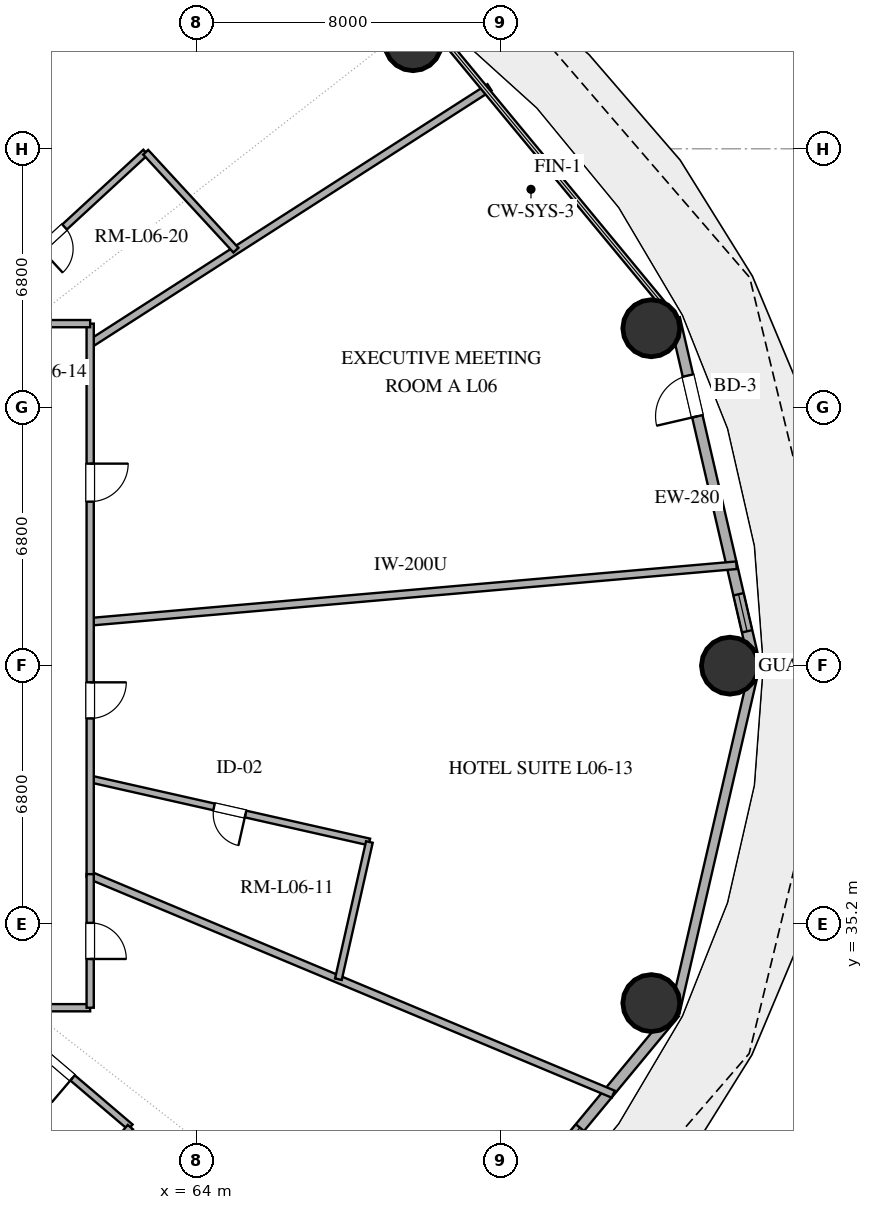
"""IFC4 building model, lengths in metres.
Left out: names, types, materials, properties, quantities, classifications, styles, units other than length and angle.
Written with IfcOpenShell. Run it as: python <this file> out.ifc"""

import sys

from ifc_helpers import new_model, si_unit, direction, frame, frame_2d, origin, origin_2d, place, context, subcontext, project, spatial, rectangle, hollow_circle, extrude, element, fill, save


model = new_model("IFC4")
c1 = context("Model", 3, precision=1e-05, world=origin(), true_north=direction((0.0, 1.0)))
c2 = subcontext(c1, "Body", "Model", "MODEL_VIEW")
j1 = project(units=[si_unit("LENGTHUNIT", "METRE"), si_unit("PLANEANGLEUNIT", "RADIAN")], contexts=[c1])
p1 = place(None, origin())
s1 = spatial("IfcSite", under=j1, at=p1, CompositionType="ELEMENT")
p2 = place(p1, origin())
s2 = spatial("IfcBuilding", under=s1, at=p2, CompositionType="ELEMENT")
p3 = place(p2, frame((0.0, 0.0, 31.8)))
s3 = spatial("IfcBuildingStorey", under=s2, at=p3, CompositionType="ELEMENT", Elevation=31.8)
for number, where, z_axis, x_axis in (
    (1, (78.035, 42.0, 0.0), (0.0, 0.0, 1.0), (1.0, 0.0, 0.0)),
    (2, (75.966, 50.878, 0.0), (0.0, 0.0, 1.0), (1.0, 0.0, 0.0)),
    (3, (69.697, 58.405, 0.0), (0.0, 0.0, 1.0), (1.0, 0.0, 0.0)),
    (4, (75.966, 33.122, 0.0), (0.0, 0.0, 1.0), (1.0, 0.0, 0.0)),
):
    element("IfcColumn", number, at=place(p3, frame(where, z_axis=z_axis, x_axis=x_axis)), inside=s3, PredefinedType="COLUMN", context=c2, shape_type="SweptSolid", body=[
        extrude(hollow_circle(Radius=0.75, WallThickness=0.04, at=origin_2d()), origin(), (0.0, 0.0, 1.0), 3.38),
    ])
p4 = place(p3, frame((78.696, 42.0, 0.0), z_axis=(0.0, 0.0, 1.0), x_axis=(-0.225454452941, 0.974253709076, 0.0)))
e5 = element("IfcWall", 5, at=p4, inside=s3, PredefinedType="SOLIDWALL", context=c2, shape_type="SweptSolid", body=[
    extrude(rectangle(XDim=9.38, YDim=0.28, at=frame_2d((4.69, 0.0))), origin(), (0.0, 0.0, 1.0), 3.38),
])
p5 = place(p4, frame((6.735, 0.0, 0.0)))
e6 = element("IfcOpeningElement", 6, at=p5, cuts=e5, PredefinedType="OPENING", context=c2, shape_type="SweptSolid", body=[
    extrude(rectangle(XDim=1.1, YDim=2.25, at=frame_2d((0.55, 1.125))), frame((0.0, 0.15, 0.0), z_axis=(0.0, -1.0, 0.0), x_axis=(1.0, 0.0, 0.0)), (0.0, 0.0, 1.0), 0.3),
])
p6 = place(p4, frame((0.929, 0.0, 0.85)))
e7 = element("IfcOpeningElement", 7, at=p6, cuts=e5, PredefinedType="OPENING", context=c2, shape_type="SweptSolid", body=[
    extrude(rectangle(XDim=1.0, YDim=1.8, at=frame_2d((0.5, 0.9))), frame((0.0, 0.15, 0.0), z_axis=(0.0, -1.0, 0.0), x_axis=(1.0, 0.0, 0.0)), (0.0, 0.0, 1.0), 0.3),
])
p7 = place(p3, frame((70.174, 25.114, 0.0), z_axis=(0.0, 0.0, 1.0), x_axis=(0.637296809613, 0.770618437657, 0.0)))
e8 = element("IfcWall", 8, at=p7, inside=s3, PredefinedType="SOLIDWALL", context=c2, shape_type="SweptSolid", body=[
    extrude(rectangle(XDim=10.053, YDim=0.28, at=frame_2d((5.027, 0.0))), origin(), (0.0, 0.0, 1.0), 3.38),
])
p8 = place(p7, frame((2.453, 0.0, 0.85)))
e9 = element("IfcOpeningElement", 9, at=p8, cuts=e8, PredefinedType="OPENING", context=c2, shape_type="SweptSolid", body=[
    extrude(rectangle(XDim=1.35, YDim=1.8, at=frame_2d((0.675, 0.9))), frame((0.0, 0.15, 0.0), z_axis=(0.0, -1.0, 0.0), x_axis=(1.0, 0.0, 0.0)), (0.0, 0.0, 1.0), 0.3),
])
p9 = place(p7, frame((4.789, 0.0, 0.85)))
e10 = element("IfcOpeningElement", 10, at=p9, cuts=e8, PredefinedType="OPENING", context=c2, shape_type="SweptSolid", body=[
    extrude(rectangle(XDim=1.35, YDim=1.8, at=frame_2d((0.675, 0.9))), frame((0.0, 0.15, 0.0), z_axis=(0.0, -1.0, 0.0), x_axis=(1.0, 0.0, 0.0)), (0.0, 0.0, 1.0), 0.3),
])
p10 = place(p3, frame((76.581, 32.862, 0.0), z_axis=(0.0, 0.0, 1.0), x_axis=(0.225454452941, 0.974253709076, 0.0)))
e11 = element("IfcWall", 11, at=p10, inside=s3, PredefinedType="SOLIDWALL", context=c2, shape_type="SweptSolid", body=[
    extrude(rectangle(XDim=9.38, YDim=0.25, at=frame_2d((4.69, 0.0))), origin(), (0.0, 0.0, 1.0), 3.38),
])
p11 = place(p3, frame((61.2, 43.155, 0.0), z_axis=(0.0, 0.0, 1.0), x_axis=(0.996194943742, 0.087152934912, 0.0)))
e12 = element("IfcWall", 12, at=p11, inside=s3, PredefinedType="PARTITIONING", context=c2, shape_type="SweptSolid", body=[
    extrude(rectangle(XDim=17.071, YDim=0.2, at=frame_2d((8.536, 0.0))), origin(), (0.0, 0.0, 1.0), 2.74),
])
p12 = place(p3, frame((53.116, 51.0, 0.0), z_axis=(0.0, 0.0, 1.0), x_axis=(0.494167535405, 0.869366693031, 0.0)))
e13 = element("IfcWall", 13, at=p12, inside=s3, PredefinedType="PARTITIONING", context=c2, shape_type="SweptSolid", body=[
    extrude(rectangle(XDim=14.934, YDim=0.2, at=frame_2d((7.467, 0.0))), origin(), (0.0, 0.0, 1.0), 2.74),
])
p13 = place(p3, frame((61.2, 50.472, 0.0), z_axis=(0.0, 0.0, 1.0), x_axis=(0.841576538847, 0.540137879863, 0.0)))
e14 = element("IfcWall", 14, at=p13, inside=s3, PredefinedType="PARTITIONING", context=c2, shape_type="SweptSolid", body=[
    extrude(rectangle(XDim=12.487, YDim=0.2, at=frame_2d((6.244, 0.0))), origin(), (0.0, 0.0, 1.0), 2.74),
])
p14 = place(p3, frame((61.2, 36.48, 0.0), z_axis=(0.0, 0.0, 1.0), x_axis=(0.922585702004, -0.385792201136, 0.0)))
e15 = element("IfcWall", 15, at=p14, inside=s3, PredefinedType="PARTITIONING", context=c2, shape_type="SweptSolid", body=[
    extrude(rectangle(XDim=14.918, YDim=0.2, at=frame_2d((7.459, 0.0))), origin(), (0.0, 0.0, 1.0), 2.74),
])
p15 = place(p3, frame((68.547, 37.361, 0.0), z_axis=(0.0, 0.0, 1.0), x_axis=(-0.975442349969, 0.220254902072, 0.0)))
e16 = element("IfcWall", 16, at=p15, inside=s3, PredefinedType="PLUMBINGWALL", context=c2, shape_type="SweptSolid", body=[
    extrude(rectangle(XDim=7.532, YDim=0.18, at=frame_2d((3.766, 0.0))), origin(), (0.0, 0.0, 1.0), 2.74),
])
p16 = place(p15, frame((3.341, 0.0, 0.0)))
e17 = element("IfcOpeningElement", 17, at=p16, cuts=e16, PredefinedType="OPENING", context=c2, shape_type="SweptSolid", body=[
    extrude(rectangle(XDim=0.85, YDim=2.1, at=frame_2d((0.425, 1.05))), frame((0.0, 0.1, 0.0), z_axis=(0.0, -1.0, 0.0), x_axis=(1.0, 0.0, 0.0)), (0.0, 0.0, 1.0), 0.2),
])
p17 = place(p3, frame((61.2, 51.0, 0.0), z_axis=(0.0, 0.0, 1.0), x_axis=(0.0, -1.0, 0.0)))
e18 = element("IfcWall", 18, at=p17, inside=s3, PredefinedType="PARTITIONING", context=c2, shape_type="SweptSolid", body=[
    extrude(rectangle(XDim=14.554, YDim=0.19, at=frame_2d((7.277, 0.0))), origin(), (0.0, 0.0, 1.0), 2.74),
])
p18 = place(p17, frame((3.684, 0.0, 0.0)))
e19 = element("IfcOpeningElement", 19, at=p18, cuts=e18, PredefinedType="OPENING", context=c2, shape_type="SweptSolid", body=[
    extrude(rectangle(XDim=1.0, YDim=2.2, at=frame_2d((0.5, 1.1))), frame((0.0, 0.105, 0.0), z_axis=(0.0, -1.0, 0.0), x_axis=(1.0, 0.0, 0.0)), (0.0, 0.0, 1.0), 0.21),
])
p19 = place(p17, frame((9.438, 0.0, 0.0)))
e20 = element("IfcOpeningElement", 20, at=p19, cuts=e18, PredefinedType="OPENING", context=c2, shape_type="SweptSolid", body=[
    extrude(rectangle(XDim=0.95, YDim=2.15, at=frame_2d((0.475, 1.075))), frame((0.0, 0.105, 0.0), z_axis=(0.0, -1.0, 0.0), x_axis=(1.0, 0.0, 0.0)), (0.0, 0.0, 1.0), 0.21),
])
p20 = place(p3, frame((55.449, 33.0, 0.0), z_axis=(0.0, 0.0, 1.0), x_axis=(0.637638501905, -0.770335732579, 0.0)))
e21 = element("IfcWall", 21, at=p20, inside=s3, PredefinedType="PARTITIONING", context=c2, shape_type="SweptSolid", body=[
    extrude(rectangle(XDim=14.187, YDim=0.2, at=frame_2d((7.094, 0.0))), origin(), (0.0, 0.0, 1.0), 2.74),
])
p21 = place(p3, frame((62.66, 55.51, 0.0), z_axis=(0.0, 0.0, 1.0), x_axis=(-0.735369975398, -0.67766584633, 0.0)))
e22 = element("IfcWall", 22, at=p21, inside=s3, PredefinedType="PLUMBINGWALL", context=c2, shape_type="SweptSolid", body=[
    extrude(rectangle(XDim=6.655, YDim=0.18, at=frame_2d((3.328, 0.0))), origin(), (0.0, 0.0, 1.0), 2.74),
])
p22 = place(p21, frame((2.903, 0.0, 0.0)))
e23 = element("IfcOpeningElement", 23, at=p22, cuts=e22, PredefinedType="OPENING", context=c2, shape_type="SweptSolid", body=[
    extrude(rectangle(XDim=0.85, YDim=2.1, at=frame_2d((0.425, 1.05))), frame((0.0, 0.1, 0.0), z_axis=(0.0, -1.0, 0.0), x_axis=(1.0, 0.0, 0.0)), (0.0, 0.0, 1.0), 0.2),
])
p23 = place(p3, frame((62.258, 29.859, 0.0), z_axis=(0.0, 0.0, 1.0), x_axis=(-0.761358380859, 0.648331254758, 0.0)))
e24 = element("IfcWall", 24, at=p23, inside=s3, PredefinedType="PLUMBINGWALL", context=c2, shape_type="SweptSolid", body=[
    extrude(rectangle(XDim=4.845, YDim=0.18, at=frame_2d((2.422, 0.0))), origin(), (0.0, 0.0, 1.0), 2.74),
])
p24 = place(p23, frame((1.997, 0.0, 0.0)))
e25 = element("IfcOpeningElement", 25, at=p24, cuts=e24, PredefinedType="OPENING", context=c2, shape_type="SweptSolid", body=[
    extrude(rectangle(XDim=0.85, YDim=2.1, at=frame_2d((0.425, 1.05))), frame((0.0, 0.1, 0.0), z_axis=(0.0, -1.0, 0.0), x_axis=(1.0, 0.0, 0.0)), (0.0, 0.0, 1.0), 0.2),
])
p25 = place(p3, frame((51.179, 51.0, 0.0), z_axis=(0.0, 0.0, 1.0), x_axis=(1.0, 0.0, 0.0)))
e26 = element("IfcWall", 26, at=p25, inside=s3, PredefinedType="PARTITIONING", context=c2, shape_type="SweptSolid", body=[
    extrude(rectangle(XDim=10.021, YDim=0.19, at=frame_2d((5.01, 0.0))), origin(), (0.0, 0.0, 1.0), 2.74),
])
p26 = place(p25, frame((3.792, 0.0, 0.0)))
e27 = element("IfcOpeningElement", 27, at=p26, cuts=e26, PredefinedType="OPENING", context=c2, shape_type="SweptSolid", body=[
    extrude(rectangle(XDim=0.95, YDim=2.15, at=frame_2d((0.475, 1.075))), frame((0.0, 0.105, 0.0), z_axis=(0.0, -1.0, 0.0), x_axis=(1.0, 0.0, 0.0)), (0.0, 0.0, 1.0), 0.21),
])
p27 = place(p3, frame((61.2, 33.0, 0.0), z_axis=(0.0, 0.0, 1.0), x_axis=(-1.0, 0.0, 0.0)))
e28 = element("IfcWall", 28, at=p27, inside=s3, PredefinedType="PARTITIONING", context=c2, shape_type="SweptSolid", body=[
    extrude(rectangle(XDim=11.3, YDim=0.19, at=frame_2d((5.65, 0.0))), origin(), (0.0, 0.0, 1.0), 2.74),
])
p28 = place(p27, frame((7.188, 0.0, 0.0)))
e29 = element("IfcOpeningElement", 29, at=p28, cuts=e28, PredefinedType="OPENING", context=c2, shape_type="SweptSolid", body=[
    extrude(rectangle(XDim=0.95, YDim=2.15, at=frame_2d((0.475, 1.075))), frame((0.0, 0.105, 0.0), z_axis=(0.0, -1.0, 0.0), x_axis=(1.0, 0.0, 0.0)), (0.0, 0.0, 1.0), 0.21),
])
p29 = place(p3, frame((67.731, 33.749, 0.0), z_axis=(0.0, 0.0, 1.0), x_axis=(0.220238608567, 0.9754460289, 0.0)))
e30 = element("IfcWall", 30, at=p29, inside=s3, PredefinedType="PLUMBINGWALL", context=c2, shape_type="SweptSolid", body=[
    extrude(rectangle(XDim=3.702, YDim=0.18, at=frame_2d((1.851, 0.0))), origin(), (0.0, 0.0, 1.0), 2.74),
])
p30 = place(p3, frame((61.2, 36.515, 0.0), z_axis=(0.0, 0.0, 1.0), x_axis=(0.0, -1.0, 0.0)))
e31 = element("IfcWall", 31, at=p30, inside=s3, PredefinedType="PARTITIONING", context=c2, shape_type="SweptSolid", body=[
    extrude(rectangle(XDim=3.515, YDim=0.19, at=frame_2d((1.758, 0.0))), origin(), (0.0, 0.0, 1.0), 2.74),
])
p31 = place(p30, frame((1.282, 0.0, 0.0)))
e32 = element("IfcOpeningElement", 32, at=p31, cuts=e31, PredefinedType="OPENING", context=c2, shape_type="SweptSolid", body=[
    extrude(rectangle(XDim=0.95, YDim=2.15, at=frame_2d((0.475, 1.075))), frame((0.0, 0.105, 0.0), z_axis=(0.0, -1.0, 0.0), x_axis=(1.0, 0.0, 0.0)), (0.0, 0.0, 1.0), 0.21),
])
p32 = place(p3, frame((65.035, 52.933, 0.0), z_axis=(0.0, 0.0, 1.0), x_axis=(-0.677675106239, 0.735361442002, 0.0)))
e33 = element("IfcWall", 33, at=p32, inside=s3, PredefinedType="PLUMBINGWALL", context=c2, shape_type="SweptSolid", body=[
    extrude(rectangle(XDim=3.504, YDim=0.18, at=frame_2d((1.752, 0.0))), origin(), (0.0, 0.0, 1.0), 2.74),
])
p33 = place(p3, frame((60.124, 27.353, 0.0), z_axis=(0.0, 0.0, 1.0), x_axis=(0.648326357453, 0.76136255111, 0.0)))
e34 = element("IfcWall", 34, at=p33, inside=s3, PredefinedType="PLUMBINGWALL", context=c2, shape_type="SweptSolid", body=[
    extrude(rectangle(XDim=3.292, YDim=0.18, at=frame_2d((1.646, 0.0))), origin(), (0.0, 0.0, 1.0), 2.74),
])
p34 = place(p5, origin())
e35 = element("IfcDoor", 35, at=p34, inside=s3, OperationType="SINGLE_SWING_LEFT", PredefinedType="DOOR", context=c2, shape_type="SweptSolid", body=[
    extrude(rectangle(XDim=1.1, YDim=2.25, at=frame_2d((0.55, 1.125))), frame((0.0, 0.025, 0.0), z_axis=(0.0, -1.0, 0.0), x_axis=(1.0, 0.0, 0.0)), (0.0, 0.0, 1.0), 0.05),
])
fill(e6, e35)
p35 = place(p9, origin())
e36 = element("IfcWindow", 36, at=p35, inside=s3, PartitioningType="SINGLE_PANEL", PredefinedType="WINDOW", context=c2, shape_type="SweptSolid", body=[
    extrude(rectangle(XDim=1.35, YDim=1.8, at=frame_2d((0.675, 0.9))), frame((0.0, 0.03, 0.0), z_axis=(0.0, -1.0, 0.0), x_axis=(1.0, 0.0, 0.0)), (0.0, 0.0, 1.0), 0.06),
])
fill(e10, e36)
p36 = place(p6, origin())
e37 = element("IfcWindow", 37, at=p36, inside=s3, PartitioningType="SINGLE_PANEL", PredefinedType="WINDOW", context=c2, shape_type="SweptSolid", body=[
    extrude(rectangle(XDim=1.0, YDim=1.8, at=frame_2d((0.5, 0.9))), frame((0.0, 0.03, 0.0), z_axis=(0.0, -1.0, 0.0), x_axis=(1.0, 0.0, 0.0)), (0.0, 0.0, 1.0), 0.06),
])
fill(e7, e37)
p37 = place(p16, origin())
e38 = element("IfcDoor", 38, at=p37, inside=s3, OperationType="SINGLE_SWING_LEFT", PredefinedType="DOOR", context=c2, shape_type="SweptSolid", body=[
    extrude(rectangle(XDim=0.85, YDim=2.1, at=frame_2d((0.425, 1.05))), frame((0.0, 0.025, 0.0), z_axis=(0.0, -1.0, 0.0), x_axis=(1.0, 0.0, 0.0)), (0.0, 0.0, 1.0), 0.05),
])
fill(e17, e38)
p38 = place(p18, origin())
e39 = element("IfcDoor", 39, at=p38, inside=s3, OperationType="SINGLE_SWING_LEFT", PredefinedType="DOOR", context=c2, shape_type="SweptSolid", body=[
    extrude(rectangle(XDim=1.0, YDim=2.2, at=frame_2d((0.5, 1.1))), frame((0.0, 0.025, 0.0), z_axis=(0.0, -1.0, 0.0), x_axis=(1.0, 0.0, 0.0)), (0.0, 0.0, 1.0), 0.05),
])
fill(e19, e39)
p39 = place(p19, origin())
e40 = element("IfcDoor", 40, at=p39, inside=s3, OperationType="SINGLE_SWING_LEFT", PredefinedType="DOOR", context=c2, shape_type="SweptSolid", body=[
    extrude(rectangle(XDim=0.95, YDim=2.15, at=frame_2d((0.475, 1.075))), frame((0.0, 0.025, 0.0), z_axis=(0.0, -1.0, 0.0), x_axis=(1.0, 0.0, 0.0)), (0.0, 0.0, 1.0), 0.05),
])
fill(e20, e40)
p40 = place(p22, origin())
e41 = element("IfcDoor", 41, at=p40, inside=s3, OperationType="SINGLE_SWING_RIGHT", PredefinedType="DOOR", context=c2, shape_type="SweptSolid", body=[
    extrude(rectangle(XDim=0.85, YDim=2.1, at=frame_2d((0.425, 1.05))), frame((0.0, 0.025, 0.0), z_axis=(0.0, -1.0, 0.0), x_axis=(1.0, 0.0, 0.0)), (0.0, 0.0, 1.0), 0.05),
])
fill(e23, e41)
p41 = place(p24, origin())
e42 = element("IfcDoor", 42, at=p41, inside=s3, OperationType="SINGLE_SWING_LEFT", PredefinedType="DOOR", context=c2, shape_type="SweptSolid", body=[
    extrude(rectangle(XDim=0.85, YDim=2.1, at=frame_2d((0.425, 1.05))), frame((0.0, 0.025, 0.0), z_axis=(0.0, -1.0, 0.0), x_axis=(1.0, 0.0, 0.0)), (0.0, 0.0, 1.0), 0.05),
])
fill(e25, e42)
p42 = place(p31, origin())
e43 = element("IfcDoor", 43, at=p42, inside=s3, OperationType="SINGLE_SWING_RIGHT", PredefinedType="DOOR", context=c2, shape_type="SweptSolid", body=[
    extrude(rectangle(XDim=0.95, YDim=2.15, at=frame_2d((0.475, 1.075))), frame((0.0, 0.025, 0.0), z_axis=(0.0, -1.0, 0.0), x_axis=(1.0, 0.0, 0.0)), (0.0, 0.0, 1.0), 0.05),
])
fill(e32, e43)
save(model, sys.argv[1])
